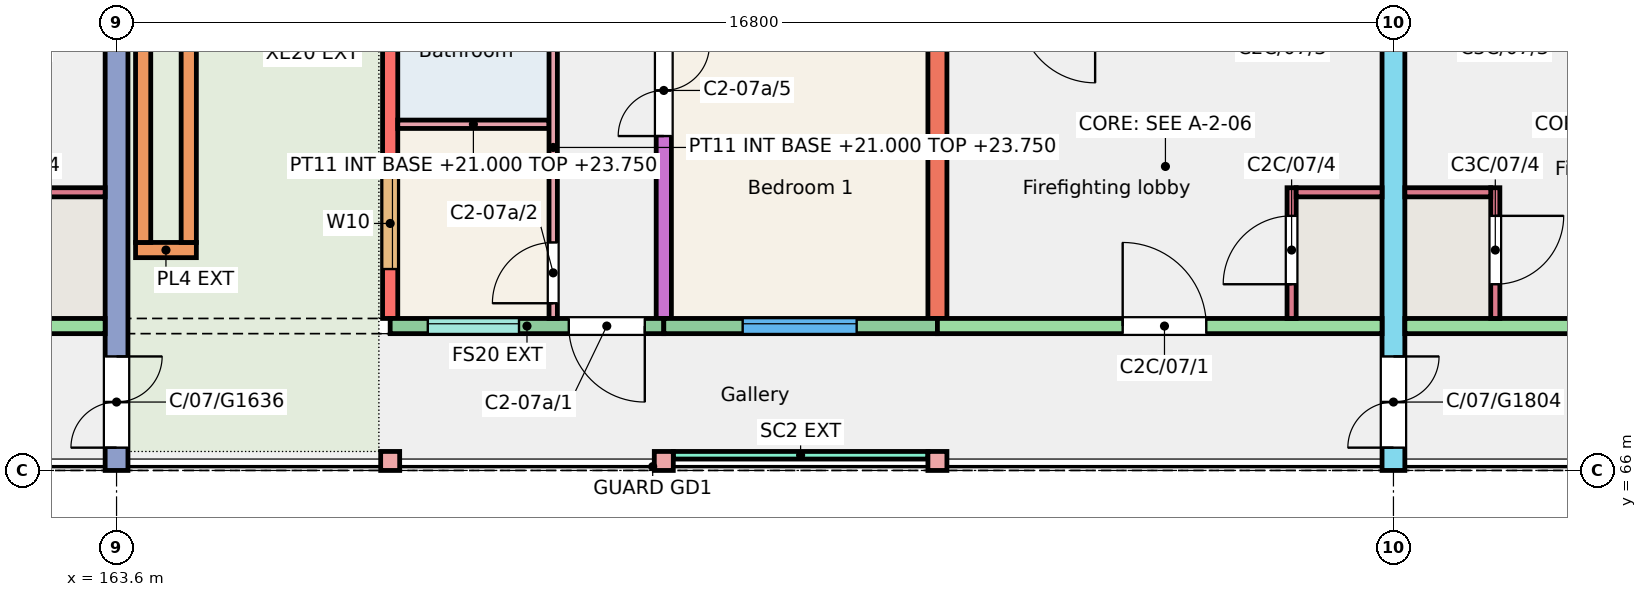
"""IFC4 building model, lengths in metres.
Left out: names, types, materials, properties, quantities, classifications, styles, units other than length and angle.
Written with IfcOpenShell. Run it as: python <this file> out.ifc"""

import sys

from ifc_helpers import new_model, si_unit, direction, frame, frame_2d, origin, origin_2d, place, context, subcontext, project, spatial, rectangle, extrude, element, fill, save


model = new_model("IFC4")
c1 = context("Model", 3, precision=1e-05, world=origin(), true_north=direction((0.0, 1.0)))
c2 = subcontext(c1, "Body", "Model", "MODEL_VIEW")
j1 = project(units=[si_unit("LENGTHUNIT", "METRE"), si_unit("PLANEANGLEUNIT", "RADIAN")], contexts=[c1])
p1 = place(None, origin())
s1 = spatial("IfcSite", under=j1, at=p1, CompositionType="ELEMENT")
p2 = place(p1, origin())
s2 = spatial("IfcBuilding", under=s1, at=p2, CompositionType="ELEMENT")
p3 = place(p2, frame((0.0, 0.0, 21.0)))
s3 = spatial("IfcBuildingStorey", under=s2, at=p3, CompositionType="ELEMENT", Elevation=21.0)
p4 = place(p3, frame((163.6, 66.0, 0.0), z_axis=(0.0, 0.0, 1.0), x_axis=(0.0, 1.0, 0.0)))
e1 = element("IfcWall", 1, at=p4, inside=s3, PredefinedType="SHEAR", context=c2, shape_type="SweptSolid", body=[
    extrude(rectangle(XDim=11.0, YDim=0.3, at=frame_2d((5.5, 0.0))), origin(), (0.0, 0.0, 1.0), 3.0),
])
p5 = place(p4, frame((0.3, 0.0, 0.0)))
e2 = element("IfcOpeningElement", 2, at=p5, cuts=e1, PredefinedType="OPENING", context=c2, shape_type="SweptSolid", body=[
    extrude(rectangle(XDim=1.2, YDim=2.1, at=frame_2d((0.6, 1.05))), frame((0.0, 0.16, 0.0), z_axis=(0.0, -1.0, 0.0), x_axis=(1.0, 0.0, 0.0)), (0.0, 0.0, 1.0), 0.32),
])
p6 = place(p3, frame((167.2, 68.0, 0.0), z_axis=(0.0, 0.0, 1.0), x_axis=(0.0, 1.0, 0.0)))
e3 = element("IfcWall", 3, at=p6, inside=s3, PredefinedType="SHEAR", context=c2, shape_type="SweptSolid", body=[
    extrude(rectangle(XDim=9.0, YDim=0.2, at=frame_2d((4.5, 0.0))), origin(), (0.0, 0.0, 1.0), 3.0),
])
p7 = place(p6, frame((0.65, 0.0, 0.9)))
e4 = element("IfcOpeningElement", 4, at=p7, cuts=e3, PredefinedType="OPENING", context=c2, shape_type="SweptSolid", body=[
    extrude(rectangle(XDim=1.2, YDim=1.5, at=frame_2d((0.6, 0.75))), frame((0.0, 0.11, 0.0), z_axis=(0.0, -1.0, 0.0), x_axis=(1.0, 0.0, 0.0)), (0.0, 0.0, 1.0), 0.22),
])
p8 = place(p6, frame((4.808, 0.0, 0.9)))
e5 = element("IfcOpeningElement", 5, at=p8, cuts=e3, PredefinedType="OPENING", context=c2, shape_type="SweptSolid", body=[
    extrude(rectangle(XDim=1.2, YDim=1.5, at=frame_2d((0.6, 0.75))), frame((0.0, 0.11, 0.0), z_axis=(0.0, -1.0, 0.0), x_axis=(1.0, 0.0, 0.0)), (0.0, 0.0, 1.0), 0.22),
])
p9 = place(p6, frame((6.305, 0.0, 0.0)))
e6 = element("IfcOpeningElement", 6, at=p9, cuts=e3, PredefinedType="OPENING", context=c2, shape_type="SweptSolid", body=[
    extrude(rectangle(XDim=1.0, YDim=2.1, at=frame_2d((0.5, 1.05))), frame((0.0, 0.11, 0.0), z_axis=(0.0, -1.0, 0.0), x_axis=(1.0, 0.0, 0.0)), (0.0, 0.0, 1.0), 0.22),
])
p10 = place(p3, frame((170.8, 68.0, 0.0), z_axis=(0.0, 0.0, 1.0), x_axis=(0.0, 1.0, 0.0)))
e7 = element("IfcWall", 7, at=p10, inside=s3, PredefinedType="SHEAR", context=c2, shape_type="SweptSolid", body=[
    extrude(rectangle(XDim=9.0, YDim=0.2, at=frame_2d((4.5, 0.0))), origin(), (0.0, 0.0, 1.0), 3.0),
])
p11 = place(p10, frame((2.4, 0.0, 0.0)))
e8 = element("IfcOpeningElement", 8, at=p11, cuts=e7, PredefinedType="OPENING", context=c2, shape_type="SweptSolid", body=[
    extrude(rectangle(XDim=1.2, YDim=2.1, at=frame_2d((0.6, 1.05))), frame((0.0, 0.11, 0.0), z_axis=(0.0, -1.0, 0.0), x_axis=(1.0, 0.0, 0.0)), (0.0, 0.0, 1.0), 0.22),
])
p12 = place(p10, frame((6.4, 0.0, 0.0)))
e9 = element("IfcOpeningElement", 9, at=p12, cuts=e7, PredefinedType="OPENING", context=c2, shape_type="SweptSolid", body=[
    extrude(rectangle(XDim=1.2, YDim=2.1, at=frame_2d((0.6, 1.05))), frame((0.0, 0.11, 0.0), z_axis=(0.0, -1.0, 0.0), x_axis=(1.0, 0.0, 0.0)), (0.0, 0.0, 1.0), 0.22),
])
p13 = place(p3, frame((174.4, 68.0, 0.0), z_axis=(0.0, 0.0, 1.0), x_axis=(0.0, 1.0, 0.0)))
e10 = element("IfcWall", 10, at=p13, inside=s3, PredefinedType="SHEAR", context=c2, shape_type="SweptSolid", body=[
    extrude(rectangle(XDim=9.0, YDim=0.25, at=frame_2d((4.5, 0.0))), origin(), (0.0, 0.0, 1.0), 3.0),
])
p14 = place(p3, frame((180.4, 66.0, 0.0), z_axis=(0.0, 0.0, 1.0), x_axis=(0.0, 1.0, 0.0)))
e11 = element("IfcWall", 11, at=p14, inside=s3, PredefinedType="SHEAR", context=c2, shape_type="SweptSolid", body=[
    extrude(rectangle(XDim=11.0, YDim=0.3, at=frame_2d((5.5, 0.0))), origin(), (0.0, 0.0, 1.0), 3.0),
])
p15 = place(p14, frame((0.3, 0.0, 0.0)))
e12 = element("IfcOpeningElement", 12, at=p15, cuts=e11, PredefinedType="OPENING", context=c2, shape_type="SweptSolid", body=[
    extrude(rectangle(XDim=1.2, YDim=2.1, at=frame_2d((0.6, 1.05))), frame((0.0, 0.16, 0.0), z_axis=(0.0, -1.0, 0.0), x_axis=(1.0, 0.0, 0.0)), (0.0, 0.0, 1.0), 0.32),
])
p16 = place(p3, frame((157.6, 67.9, 0.0), z_axis=(0.0, 0.0, 1.0), x_axis=(1.0, 0.0, 0.0)))
e13 = element("IfcWall", 13, at=p16, inside=s3, PredefinedType="SHEAR", context=c2, shape_type="SweptSolid", body=[
    extrude(rectangle(XDim=5.85, YDim=0.2, at=frame_2d((2.925, 0.0))), origin(), (0.0, 0.0, 1.0), 3.0),
])
p17 = place(p16, frame((2.438, 0.0, 0.0)))
e14 = element("IfcOpeningElement", 14, at=p17, cuts=e13, PredefinedType="OPENING", context=c2, shape_type="SweptSolid", body=[
    extrude(rectangle(XDim=1.1, YDim=2.1, at=frame_2d((0.55, 1.05))), frame((0.0, 0.11, 0.0), z_axis=(0.0, -1.0, 0.0), x_axis=(1.0, 0.0, 0.0)), (0.0, 0.0, 1.0), 0.22),
])
p18 = place(p3, frame((162.32, 69.66, 0.0), z_axis=(0.0, 0.0, 1.0), x_axis=(1.0, 0.0, 0.0)))
e15 = element("IfcWall", 15, at=p18, inside=s3, PredefinedType="SHEAR", context=c2, shape_type="SweptSolid", body=[
    extrude(rectangle(XDim=1.13, YDim=0.12, at=frame_2d((0.565, 0.0))), origin(), (0.0, 0.0, 1.0), 3.0),
])
p19 = place(p3, frame((167.2, 67.9, 0.0), z_axis=(0.0, 0.0, 1.0), x_axis=(1.0, 0.0, 0.0)))
e16 = element("IfcWall", 16, at=p19, inside=s3, PredefinedType="SOLIDWALL", context=c2, shape_type="SweptSolid", body=[
    extrude(rectangle(XDim=3.6, YDim=0.2, at=frame_2d((1.8, 0.0))), origin(), (0.0, 0.0, 1.0), 3.0),
])
p20 = place(p19, frame((0.495, 0.0, 1.1)))
e17 = element("IfcOpeningElement", 17, at=p20, cuts=e16, PredefinedType="OPENING", context=c2, shape_type="SweptSolid", body=[
    extrude(rectangle(XDim=1.2, YDim=1.3, at=frame_2d((0.6, 0.65))), frame((0.0, 0.11, 0.0), z_axis=(0.0, -1.0, 0.0), x_axis=(1.0, 0.0, 0.0)), (0.0, 0.0, 1.0), 0.22),
])
p21 = place(p19, frame((2.35, 0.0, 0.0)))
e18 = element("IfcOpeningElement", 18, at=p21, cuts=e16, PredefinedType="OPENING", context=c2, shape_type="SweptSolid", body=[
    extrude(rectangle(XDim=1.0, YDim=2.1, at=frame_2d((0.5, 1.05))), frame((0.0, 0.11, 0.0), z_axis=(0.0, -1.0, 0.0), x_axis=(1.0, 0.0, 0.0)), (0.0, 0.0, 1.0), 0.22),
])
p22 = place(p3, frame((170.8, 67.9, 0.0), z_axis=(0.0, 0.0, 1.0), x_axis=(1.0, 0.0, 0.0)))
e19 = element("IfcWall", 19, at=p22, inside=s3, PredefinedType="SOLIDWALL", context=c2, shape_type="SweptSolid", body=[
    extrude(rectangle(XDim=3.6, YDim=0.2, at=frame_2d((1.8, 0.0))), origin(), (0.0, 0.0, 1.0), 3.0),
])
p23 = place(p22, frame((1.038, 0.0, 0.9)))
e20 = element("IfcOpeningElement", 20, at=p23, cuts=e19, PredefinedType="OPENING", context=c2, shape_type="SweptSolid", body=[
    extrude(rectangle(XDim=1.5, YDim=1.5, at=frame_2d((0.75, 0.75))), frame((0.0, 0.11, 0.0), z_axis=(0.0, -1.0, 0.0), x_axis=(1.0, 0.0, 0.0)), (0.0, 0.0, 1.0), 0.22),
])
p24 = place(p3, frame((174.4, 67.9, 0.0), z_axis=(0.0, 0.0, 1.0), x_axis=(1.0, 0.0, 0.0)))
e21 = element("IfcWall", 21, at=p24, inside=s3, PredefinedType="SHEAR", context=c2, shape_type="SweptSolid", body=[
    extrude(rectangle(XDim=5.85, YDim=0.2, at=frame_2d((2.925, 0.0))), origin(), (0.0, 0.0, 1.0), 3.0),
])
p25 = place(p24, frame((2.438, 0.0, 0.0)))
e22 = element("IfcOpeningElement", 22, at=p25, cuts=e21, PredefinedType="OPENING", context=c2, shape_type="SweptSolid", body=[
    extrude(rectangle(XDim=1.1, YDim=2.1, at=frame_2d((0.55, 1.05))), frame((0.0, 0.11, 0.0), z_axis=(0.0, -1.0, 0.0), x_axis=(1.0, 0.0, 0.0)), (0.0, 0.0, 1.0), 0.22),
])
p26 = place(p3, frame((179.06, 68.0, 0.0), z_axis=(0.0, 0.0, 1.0), x_axis=(0.0, 1.0, 0.0)))
e23 = element("IfcWall", 23, at=p26, inside=s3, PredefinedType="SHEAR", context=c2, shape_type="SweptSolid", body=[
    extrude(rectangle(XDim=1.72, YDim=0.12, at=frame_2d((0.86, 0.0))), origin(), (0.0, 0.0, 1.0), 3.0),
])
p27 = place(p26, frame((0.45, 0.0, 0.0)))
e24 = element("IfcOpeningElement", 24, at=p27, cuts=e23, PredefinedType="OPENING", context=c2, shape_type="SweptSolid", body=[
    extrude(rectangle(XDim=0.9, YDim=2.1, at=frame_2d((0.45, 1.05))), frame((0.0, 0.07, 0.0), z_axis=(0.0, -1.0, 0.0), x_axis=(1.0, 0.0, 0.0)), (0.0, 0.0, 1.0), 0.14),
])
p28 = place(p3, frame((179.12, 69.66, 0.0), z_axis=(0.0, 0.0, 1.0), x_axis=(1.0, 0.0, 0.0)))
e25 = element("IfcWall", 25, at=p28, inside=s3, PredefinedType="SHEAR", context=c2, shape_type="SweptSolid", body=[
    extrude(rectangle(XDim=1.13, YDim=0.12, at=frame_2d((0.565, 0.0))), origin(), (0.0, 0.0, 1.0), 3.0),
])
p29 = place(p3, frame((180.55, 67.9, 0.0), z_axis=(0.0, 0.0, 1.0), x_axis=(1.0, 0.0, 0.0)))
e26 = element("IfcWall", 26, at=p29, inside=s3, PredefinedType="SHEAR", context=c2, shape_type="SweptSolid", body=[
    extrude(rectangle(XDim=5.85, YDim=0.2, at=frame_2d((2.925, 0.0))), origin(), (0.0, 0.0, 1.0), 3.0),
])
p30 = place(p29, frame((2.312, 0.0, 0.0)))
e27 = element("IfcOpeningElement", 27, at=p30, cuts=e26, PredefinedType="OPENING", context=c2, shape_type="SweptSolid", body=[
    extrude(rectangle(XDim=1.1, YDim=2.1, at=frame_2d((0.55, 1.05))), frame((0.0, 0.11, 0.0), z_axis=(0.0, -1.0, 0.0), x_axis=(1.0, 0.0, 0.0)), (0.0, 0.0, 1.0), 0.22),
])
p31 = place(p3, frame((181.74, 68.0, 0.0), z_axis=(0.0, 0.0, 1.0), x_axis=(0.0, 1.0, 0.0)))
e28 = element("IfcWall", 28, at=p31, inside=s3, PredefinedType="SHEAR", context=c2, shape_type="SweptSolid", body=[
    extrude(rectangle(XDim=1.72, YDim=0.12, at=frame_2d((0.86, 0.0))), origin(), (0.0, 0.0, 1.0), 3.0),
])
p32 = place(p31, frame((0.45, 0.0, 0.0)))
e29 = element("IfcOpeningElement", 29, at=p32, cuts=e28, PredefinedType="OPENING", context=c2, shape_type="SweptSolid", body=[
    extrude(rectangle(XDim=0.9, YDim=2.1, at=frame_2d((0.45, 1.05))), frame((0.0, 0.07, 0.0), z_axis=(0.0, -1.0, 0.0), x_axis=(1.0, 0.0, 0.0)), (0.0, 0.0, 1.0), 0.14),
])
p33 = place(p3, frame((180.55, 69.66, 0.0), z_axis=(0.0, 0.0, 1.0), x_axis=(1.0, 0.0, 0.0)))
e30 = element("IfcWall", 30, at=p33, inside=s3, PredefinedType="SHEAR", context=c2, shape_type="SweptSolid", body=[
    extrude(rectangle(XDim=1.13, YDim=0.12, at=frame_2d((0.565, 0.0))), origin(), (0.0, 0.0, 1.0), 3.0),
])
for number, where, z_axis, x_axis in (
    (31, (167.2, 66.125, 0.0), (0.0, 0.0, 1.0), (1.0, 0.0, 0.0)),
    (32, (170.8, 66.125, 0.0), (0.0, 0.0, 1.0), (1.0, 0.0, 0.0)),
    (33, (174.4, 66.125, 0.0), (0.0, 0.0, 1.0), (1.0, 0.0, 0.0)),
):
    element("IfcColumn", number, at=place(p3, frame(where, z_axis=z_axis, x_axis=x_axis)), inside=s3, PredefinedType="COLUMN", context=c2, shape_type="SweptSolid", body=[
        extrude(rectangle(XDim=0.25, YDim=0.25, at=origin_2d()), origin(), (0.0, 0.0, 1.0), 3.0),
    ])
p34 = place(p3, frame((163.85, 68.9, 0.01), z_axis=(0.0, 0.0, 1.0), x_axis=(1.0, 0.0, 0.0)))
e34 = element("IfcWall", 34, at=p34, inside=s3, PredefinedType="SOLIDWALL", context=c2, shape_type="SweptSolid", body=[
    extrude(rectangle(XDim=0.8, YDim=0.2, at=frame_2d((0.4, 0.0))), origin(), (0.0, 0.0, 1.0), 0.45),
])
for number, where, z_axis, x_axis in (
    (35, (163.95, 69.0, 0.01), (0.0, 0.0, 1.0), (0.0, 1.0, 0.0)),
    (36, (164.55, 69.0, 0.01), (0.0, 0.0, 1.0), (0.0, 1.0, 0.0)),
):
    element("IfcWall", number, at=place(p3, frame(where, z_axis=z_axis, x_axis=x_axis)), inside=s3, PredefinedType="SOLIDWALL", context=c2, shape_type="SweptSolid", body=[
        extrude(rectangle(XDim=7.5, YDim=0.2, at=frame_2d((3.75, 0.0))), origin(), (0.0, 0.0, 1.0), 0.45),
    ])
p35 = place(p3, frame((170.925, 66.2, 0.0), z_axis=(0.0, 0.0, 1.0), x_axis=(1.0, 0.0, 0.0)))
e37 = element("IfcWall", 37, at=p35, inside=s3, PredefinedType="SOLIDWALL", context=c2, shape_type="SweptSolid", body=[
    extrude(rectangle(XDim=3.35, YDim=0.1, at=frame_2d((1.675, 0.0))), origin(), (0.0, 0.0, 1.0), 2.45),
])
p36 = place(p3, frame((167.3, 70.555, 0.0), z_axis=(0.0, 0.0, 1.0), x_axis=(1.0, 0.0, 0.0)))
e38 = element("IfcWall", 38, at=p36, inside=s3, PredefinedType="PARTITIONING", context=c2, shape_type="SweptSolid", body=[
    extrude(rectangle(XDim=1.99, YDim=0.11, at=frame_2d((0.995, 0.0))), origin(), (0.0, 0.0, 1.0), 2.75),
])
p37 = place(p3, frame((169.345, 68.0, 0.0), z_axis=(0.0, 0.0, 1.0), x_axis=(0.0, 1.0, 0.0)))
e39 = element("IfcWall", 39, at=p37, inside=s3, PredefinedType="PARTITIONING", context=c2, shape_type="SweptSolid", body=[
    extrude(rectangle(XDim=4.5, YDim=0.11, at=frame_2d((2.25, 0.0))), origin(), (0.0, 0.0, 1.0), 2.75),
])
p38 = place(p37, frame((0.2, 0.0, 0.0)))
e40 = element("IfcOpeningElement", 40, at=p38, cuts=e39, PredefinedType="OPENING", context=c2, shape_type="SweptSolid", body=[
    extrude(rectangle(XDim=0.8, YDim=2.1, at=frame_2d((0.4, 1.05))), frame((0.0, 0.065, 0.0), z_axis=(0.0, -1.0, 0.0), x_axis=(1.0, 0.0, 0.0)), (0.0, 0.0, 1.0), 0.13),
])
p39 = place(p37, frame((3.55, 0.0, 0.0)))
e41 = element("IfcOpeningElement", 41, at=p39, cuts=e39, PredefinedType="OPENING", context=c2, shape_type="SweptSolid", body=[
    extrude(rectangle(XDim=0.8, YDim=2.1, at=frame_2d((0.4, 1.05))), frame((0.0, 0.065, 0.0), z_axis=(0.0, -1.0, 0.0), x_axis=(1.0, 0.0, 0.0)), (0.0, 0.0, 1.0), 0.13),
])
p40 = place(p23, origin())
e42 = element("IfcWindow", 42, at=p40, inside=s3, PartitioningType="SINGLE_PANEL", PredefinedType="WINDOW", context=c2, shape_type="SweptSolid", body=[
    extrude(rectangle(XDim=1.5, YDim=1.5, at=frame_2d((0.75, 0.75))), frame((0.0, 0.06, 0.0), z_axis=(0.0, -1.0, 0.0), x_axis=(1.0, 0.0, 0.0)), (0.0, 0.0, 1.0), 0.06),
])
fill(e20, e42)
p41 = place(p20, origin())
e43 = element("IfcWindow", 43, at=p41, inside=s3, PartitioningType="SINGLE_PANEL", PredefinedType="WINDOW", context=c2, shape_type="SweptSolid", body=[
    extrude(rectangle(XDim=1.2, YDim=1.3, at=frame_2d((0.6, 0.65))), frame((0.0, 0.06, 0.0), z_axis=(0.0, -1.0, 0.0), x_axis=(1.0, 0.0, 0.0)), (0.0, 0.0, 1.0), 0.06),
])
fill(e17, e43)
p42 = place(p7, origin())
e44 = element("IfcWindow", 44, at=p42, inside=s3, PartitioningType="SINGLE_PANEL", PredefinedType="WINDOW", context=c2, shape_type="SweptSolid", body=[
    extrude(rectangle(XDim=1.2, YDim=1.5, at=frame_2d((0.6, 0.75))), frame((0.0, 0.0, 0.0), z_axis=(0.0, -1.0, 0.0), x_axis=(1.0, 0.0, 0.0)), (0.0, 0.0, 1.0), 0.06),
])
fill(e4, e44)
p43 = place(p21, origin())
e45 = element("IfcDoor", 45, at=p43, inside=s3, OperationType="SINGLE_SWING_RIGHT", PredefinedType="DOOR", context=c2, shape_type="SweptSolid", body=[
    extrude(rectangle(XDim=1.0, YDim=2.1, at=frame_2d((0.5, 1.05))), frame((0.0, 0.025, 0.0), z_axis=(0.0, -1.0, 0.0), x_axis=(1.0, 0.0, 0.0)), (0.0, 0.0, 1.0), 0.05),
])
fill(e18, e45)
p44 = place(p38, origin())
e46 = element("IfcDoor", 46, at=p44, inside=s3, OperationType="SINGLE_SWING_LEFT", PredefinedType="DOOR", context=c2, shape_type="SweptSolid", body=[
    extrude(rectangle(XDim=0.8, YDim=2.1, at=frame_2d((0.4, 1.05))), frame((0.0, 0.025, 0.0), z_axis=(0.0, -1.0, 0.0), x_axis=(1.0, 0.0, 0.0)), (0.0, 0.0, 1.0), 0.05),
])
fill(e40, e46)
p45 = place(p11, origin())
e47 = element("IfcDoor", 47, at=p45, inside=s3, OperationType="DOUBLE_DOOR_SINGLE_SWING", PredefinedType="DOOR", context=c2, shape_type="SweptSolid", body=[
    extrude(rectangle(XDim=1.2, YDim=2.1, at=frame_2d((0.6, 1.05))), frame((0.0, 0.025, 0.0), z_axis=(0.0, -1.0, 0.0), x_axis=(1.0, 0.0, 0.0)), (0.0, 0.0, 1.0), 0.05),
])
fill(e8, e47)
p46 = place(p25, origin())
e48 = element("IfcDoor", 48, at=p46, inside=s3, OperationType="SINGLE_SWING_LEFT", PredefinedType="DOOR", context=c2, shape_type="SweptSolid", body=[
    extrude(rectangle(XDim=1.1, YDim=2.1, at=frame_2d((0.55, 1.05))), frame((0.0, 0.025, 0.0), z_axis=(0.0, -1.0, 0.0), x_axis=(1.0, 0.0, 0.0)), (0.0, 0.0, 1.0), 0.05),
])
fill(e22, e48)
p47 = place(p27, origin())
e49 = element("IfcDoor", 49, at=p47, inside=s3, OperationType="SINGLE_SWING_LEFT", PredefinedType="DOOR", context=c2, shape_type="SweptSolid", body=[
    extrude(rectangle(XDim=0.9, YDim=2.1, at=frame_2d((0.45, 1.05))), frame((0.0, 0.025, 0.0), z_axis=(0.0, -1.0, 0.0), x_axis=(1.0, 0.0, 0.0)), (0.0, 0.0, 1.0), 0.05),
])
fill(e24, e49)
p48 = place(p32, origin())
e50 = element("IfcDoor", 50, at=p48, inside=s3, OperationType="SINGLE_SWING_RIGHT", PredefinedType="DOOR", context=c2, shape_type="SweptSolid", body=[
    extrude(rectangle(XDim=0.9, YDim=2.1, at=frame_2d((0.45, 1.05))), frame((0.0, 0.025, 0.0), z_axis=(0.0, -1.0, 0.0), x_axis=(1.0, 0.0, 0.0)), (0.0, 0.0, 1.0), 0.05),
])
fill(e29, e50)
p49 = place(p5, origin())
e51 = element("IfcDoor", 51, at=p49, inside=s3, OperationType="DOUBLE_DOOR_SINGLE_SWING", PredefinedType="DOOR", context=c2, shape_type="SweptSolid", body=[
    extrude(rectangle(XDim=1.2, YDim=2.1, at=frame_2d((0.6, 1.05))), frame((0.0, 0.025, 0.0), z_axis=(0.0, -1.0, 0.0), x_axis=(1.0, 0.0, 0.0)), (0.0, 0.0, 1.0), 0.05),
])
fill(e2, e51)
p50 = place(p15, origin())
e52 = element("IfcDoor", 52, at=p50, inside=s3, OperationType="DOUBLE_DOOR_SINGLE_SWING", PredefinedType="DOOR", context=c2, shape_type="SweptSolid", body=[
    extrude(rectangle(XDim=1.2, YDim=2.1, at=frame_2d((0.6, 1.05))), frame((0.0, 0.025, 0.0), z_axis=(0.0, -1.0, 0.0), x_axis=(1.0, 0.0, 0.0)), (0.0, 0.0, 1.0), 0.05),
])
fill(e12, e52)
save(model, sys.argv[1])
